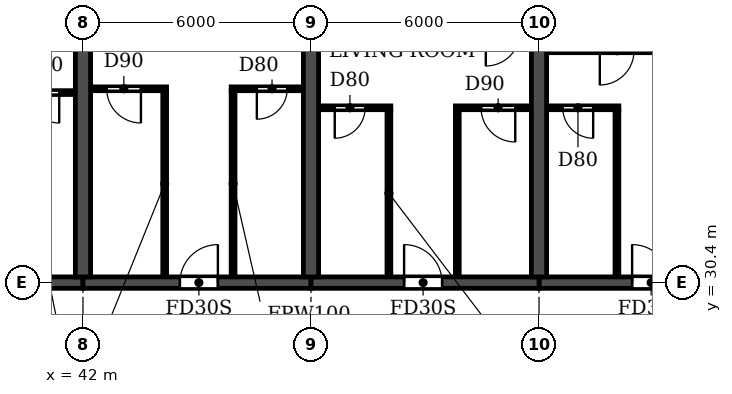
"""IFC4 building model, lengths in metres.
Left out: names, types, materials, properties, quantities, classifications, styles, units other than length and angle.
Written with IfcOpenShell. Run it as: python <this file> out.ifc"""

import sys

from ifc_helpers import new_model, si_unit, direction, frame, frame_2d, origin, place, context, subcontext, project, spatial, rectangle, extrude, element, fill, save


model = new_model("IFC4")
c1 = context("Model", 3, precision=1e-05, world=origin(), true_north=direction((0.0, 1.0)))
c2 = subcontext(c1, "Body", "Model", "MODEL_VIEW")
j1 = project(units=[si_unit("LENGTHUNIT", "METRE"), si_unit("PLANEANGLEUNIT", "RADIAN")], contexts=[c1])
p1 = place(None, origin())
s1 = spatial("IfcSite", under=j1, at=p1, CompositionType="ELEMENT")
p2 = place(p1, origin())
s2 = spatial("IfcBuilding", under=s1, at=p2, CompositionType="ELEMENT")
p3 = place(p2, frame((0.0, 0.0, 23.4)))
s3 = spatial("IfcBuildingStorey", under=s2, at=p3, CompositionType="ELEMENT", Elevation=23.4)
for number, where, z_axis, x_axis in (
    (1, (42.0, 30.55, 0.0), (0.0, 0.0, 1.0), (0.0, 1.0, 0.0)),
    (2, (48.0, 30.55, 0.0), (0.0, 0.0, 1.0), (0.0, 1.0, 0.0)),
    (3, (54.0, 30.55, 0.0), (0.0, 0.0, 1.0), (0.0, 1.0, 0.0)),
):
    element("IfcWall", number, at=place(p3, frame(where, z_axis=z_axis, x_axis=x_axis)), inside=s3, PredefinedType="SHEAR", context=c2, shape_type="SweptSolid", body=[
        extrude(rectangle(XDim=14.05, YDim=0.4, at=frame_2d((7.025, 0.0))), origin(), (0.0, 0.0, 1.0), 3.05),
    ])
p4 = place(p3, frame((36.0, 30.4, 0.0), z_axis=(0.0, 0.0, 1.0), x_axis=(1.0, 0.0, 0.0)))
e4 = element("IfcWall", 4, at=p4, inside=s3, PredefinedType="SHEAR", context=c2, shape_type="SweptSolid", body=[
    extrude(rectangle(XDim=6.0, YDim=0.3, at=frame_2d((3.0, 0.0))), origin(), (0.0, 0.0, 1.0), 2.45),
])
p5 = place(p4, frame((2.55, 0.0, 0.0)))
e5 = element("IfcOpeningElement", 5, at=p5, cuts=e4, PredefinedType="OPENING", context=c2, shape_type="SweptSolid", body=[
    extrude(rectangle(XDim=1.0, YDim=2.1, at=frame_2d((0.5, 1.05))), frame((0.0, 0.16, 0.0), z_axis=(0.0, -1.0, 0.0), x_axis=(1.0, 0.0, 0.0)), (0.0, 0.0, 1.0), 0.32),
])
p6 = place(p3, frame((42.0, 30.4, 0.0), z_axis=(0.0, 0.0, 1.0), x_axis=(1.0, 0.0, 0.0)))
e6 = element("IfcWall", 6, at=p6, inside=s3, PredefinedType="SHEAR", context=c2, shape_type="SweptSolid", body=[
    extrude(rectangle(XDim=6.0, YDim=0.3, at=frame_2d((3.0, 0.0))), origin(), (0.0, 0.0, 1.0), 2.45),
])
p7 = place(p6, frame((2.55, 0.0, 0.0)))
e7 = element("IfcOpeningElement", 7, at=p7, cuts=e6, PredefinedType="OPENING", context=c2, shape_type="SweptSolid", body=[
    extrude(rectangle(XDim=1.0, YDim=2.1, at=frame_2d((0.5, 1.05))), frame((0.0, 0.16, 0.0), z_axis=(0.0, -1.0, 0.0), x_axis=(1.0, 0.0, 0.0)), (0.0, 0.0, 1.0), 0.32),
])
p8 = place(p3, frame((48.0, 30.4, 0.0), z_axis=(0.0, 0.0, 1.0), x_axis=(1.0, 0.0, 0.0)))
e8 = element("IfcWall", 8, at=p8, inside=s3, PredefinedType="SHEAR", context=c2, shape_type="SweptSolid", body=[
    extrude(rectangle(XDim=6.0, YDim=0.3, at=frame_2d((3.0, 0.0))), origin(), (0.0, 0.0, 1.0), 2.45),
])
p9 = place(p8, frame((2.45, 0.0, 0.0)))
e9 = element("IfcOpeningElement", 9, at=p9, cuts=e8, PredefinedType="OPENING", context=c2, shape_type="SweptSolid", body=[
    extrude(rectangle(XDim=1.0, YDim=2.1, at=frame_2d((0.5, 1.05))), frame((0.0, 0.16, 0.0), z_axis=(0.0, -1.0, 0.0), x_axis=(1.0, 0.0, 0.0)), (0.0, 0.0, 1.0), 0.32),
])
p10 = place(p3, frame((54.0, 30.4, 0.0), z_axis=(0.0, 0.0, 1.0), x_axis=(1.0, 0.0, 0.0)))
e10 = element("IfcWall", 10, at=p10, inside=s3, PredefinedType="SHEAR", context=c2, shape_type="SweptSolid", body=[
    extrude(rectangle(XDim=6.0, YDim=0.3, at=frame_2d((3.0, 0.0))), origin(), (0.0, 0.0, 1.0), 2.45),
])
p11 = place(p10, frame((2.45, 0.0, 0.0)))
e11 = element("IfcOpeningElement", 11, at=p11, cuts=e10, PredefinedType="OPENING", context=c2, shape_type="SweptSolid", body=[
    extrude(rectangle(XDim=1.0, YDim=2.1, at=frame_2d((0.5, 1.05))), frame((0.0, 0.16, 0.0), z_axis=(0.0, -1.0, 0.0), x_axis=(1.0, 0.0, 0.0)), (0.0, 0.0, 1.0), 0.32),
])
p12 = place(p3, frame((48.21, 35.0, 0.0), z_axis=(0.0, 0.0, 1.0), x_axis=(1.0, 0.0, 0.0)))
e12 = element("IfcWall", 12, at=p12, inside=s3, PredefinedType="PARTITIONING", context=c2, shape_type="SweptSolid", body=[
    extrude(rectangle(XDim=1.89, YDim=0.1, at=frame_2d((0.945, 0.0))), origin(), (0.0, 0.0, 1.0), 3.05),
])
p13 = place(p12, frame((0.415, 0.0, 0.0)))
e13 = element("IfcOpeningElement", 13, at=p13, cuts=e12, PredefinedType="OPENING", context=c2, shape_type="SweptSolid", body=[
    extrude(rectangle(XDim=0.8, YDim=2.1, at=frame_2d((0.4, 1.05))), frame((0.0, 0.06, 0.0), z_axis=(0.0, -1.0, 0.0), x_axis=(1.0, 0.0, 0.0)), (0.0, 0.0, 1.0), 0.12),
])
p14 = place(p3, frame((51.8, 35.0, 0.0), z_axis=(0.0, 0.0, 1.0), x_axis=(1.0, 0.0, 0.0)))
e14 = element("IfcWall", 14, at=p14, inside=s3, PredefinedType="PARTITIONING", context=c2, shape_type="SweptSolid", body=[
    extrude(rectangle(XDim=1.99, YDim=0.1, at=frame_2d((0.995, 0.0))), origin(), (0.0, 0.0, 1.0), 3.05),
])
p15 = place(p14, frame((0.675, 0.0, 0.0)))
e15 = element("IfcOpeningElement", 15, at=p15, cuts=e14, PredefinedType="OPENING", context=c2, shape_type="SweptSolid", body=[
    extrude(rectangle(XDim=0.9, YDim=2.1, at=frame_2d((0.45, 1.05))), frame((0.0, 0.06, 0.0), z_axis=(0.0, -1.0, 0.0), x_axis=(1.0, 0.0, 0.0)), (0.0, 0.0, 1.0), 0.12),
])
p16 = place(p3, frame((54.21, 35.0, 0.0), z_axis=(0.0, 0.0, 1.0), x_axis=(1.0, 0.0, 0.0)))
e16 = element("IfcWall", 16, at=p16, inside=s3, PredefinedType="PARTITIONING", context=c2, shape_type="SweptSolid", body=[
    extrude(rectangle(XDim=1.89, YDim=0.1, at=frame_2d((0.945, 0.0))), origin(), (0.0, 0.0, 1.0), 3.05),
])
p17 = place(p16, frame((0.415, 0.0, 0.0)))
e17 = element("IfcOpeningElement", 17, at=p17, cuts=e16, PredefinedType="OPENING", context=c2, shape_type="SweptSolid", body=[
    extrude(rectangle(XDim=0.8, YDim=2.1, at=frame_2d((0.4, 1.05))), frame((0.0, 0.06, 0.0), z_axis=(0.0, -1.0, 0.0), x_axis=(1.0, 0.0, 0.0)), (0.0, 0.0, 1.0), 0.12),
])
p18 = place(p3, frame((39.9, 35.4, 0.0), z_axis=(0.0, 0.0, 1.0), x_axis=(1.0, 0.0, 0.0)))
e18 = element("IfcWall", 18, at=p18, inside=s3, PredefinedType="PARTITIONING", context=c2, shape_type="SweptSolid", body=[
    extrude(rectangle(XDim=1.89, YDim=0.1, at=frame_2d((0.945, 0.0))), origin(), (0.0, 0.0, 1.0), 3.05),
])
p19 = place(p18, frame((0.675, 0.0, 0.0)))
e19 = element("IfcOpeningElement", 19, at=p19, cuts=e18, PredefinedType="OPENING", context=c2, shape_type="SweptSolid", body=[
    extrude(rectangle(XDim=0.8, YDim=2.1, at=frame_2d((0.4, 1.05))), frame((0.0, 0.06, 0.0), z_axis=(0.0, -1.0, 0.0), x_axis=(1.0, 0.0, 0.0)), (0.0, 0.0, 1.0), 0.12),
])
p20 = place(p3, frame((42.21, 35.5, 0.0), z_axis=(0.0, 0.0, 1.0), x_axis=(1.0, 0.0, 0.0)))
e20 = element("IfcWall", 20, at=p20, inside=s3, PredefinedType="PARTITIONING", context=c2, shape_type="SweptSolid", body=[
    extrude(rectangle(XDim=1.99, YDim=0.1, at=frame_2d((0.995, 0.0))), origin(), (0.0, 0.0, 1.0), 3.05),
])
p21 = place(p20, frame((0.415, 0.0, 0.0)))
e21 = element("IfcOpeningElement", 21, at=p21, cuts=e20, PredefinedType="OPENING", context=c2, shape_type="SweptSolid", body=[
    extrude(rectangle(XDim=0.9, YDim=2.1, at=frame_2d((0.45, 1.05))), frame((0.0, 0.06, 0.0), z_axis=(0.0, -1.0, 0.0), x_axis=(1.0, 0.0, 0.0)), (0.0, 0.0, 1.0), 0.12),
])
p22 = place(p3, frame((45.9, 35.5, 0.0), z_axis=(0.0, 0.0, 1.0), x_axis=(1.0, 0.0, 0.0)))
e22 = element("IfcWall", 22, at=p22, inside=s3, PredefinedType="PARTITIONING", context=c2, shape_type="SweptSolid", body=[
    extrude(rectangle(XDim=1.89, YDim=0.1, at=frame_2d((0.945, 0.0))), origin(), (0.0, 0.0, 1.0), 3.05),
])
p23 = place(p22, frame((0.675, 0.0, 0.0)))
e23 = element("IfcOpeningElement", 23, at=p23, cuts=e22, PredefinedType="OPENING", context=c2, shape_type="SweptSolid", body=[
    extrude(rectangle(XDim=0.8, YDim=2.1, at=frame_2d((0.4, 1.05))), frame((0.0, 0.06, 0.0), z_axis=(0.0, -1.0, 0.0), x_axis=(1.0, 0.0, 0.0)), (0.0, 0.0, 1.0), 0.12),
])
for number, where, z_axis, x_axis in (
    (24, (44.15, 30.56, 0.0), (0.0, 0.0, 1.0), (0.0, 1.0, 0.0)),
    (25, (45.95, 30.56, 0.0), (0.0, 0.0, 1.0), (0.0, 1.0, 0.0)),
):
    element("IfcWall", number, at=place(p3, frame(where, z_axis=z_axis, x_axis=x_axis)), inside=s3, PredefinedType="PARTITIONING", context=c2, shape_type="SweptSolid", body=[
        extrude(rectangle(XDim=4.89, YDim=0.1, at=frame_2d((2.445, 0.0))), origin(), (0.0, 0.0, 1.0), 3.05),
    ])
for number, where, z_axis, x_axis in (
    (26, (50.05, 30.56, 0.0), (0.0, 0.0, 1.0), (0.0, 1.0, 0.0)),
    (27, (51.85, 30.56, 0.0), (0.0, 0.0, 1.0), (0.0, 1.0, 0.0)),
    (28, (56.05, 30.56, 0.0), (0.0, 0.0, 1.0), (0.0, 1.0, 0.0)),
):
    element("IfcWall", number, at=place(p3, frame(where, z_axis=z_axis, x_axis=x_axis)), inside=s3, PredefinedType="PARTITIONING", context=c2, shape_type="SweptSolid", body=[
        extrude(rectangle(XDim=4.39, YDim=0.1, at=frame_2d((2.195, 0.0))), origin(), (0.0, 0.0, 1.0), 3.05),
    ])
p24 = place(p19, frame((0.8, 0.0, 0.0), z_axis=(0.0, 0.0, 1.0), x_axis=(-1.0, 0.0, 0.0)))
e29 = element("IfcDoor", 29, at=p24, inside=s3, OperationType="SINGLE_SWING_LEFT", PredefinedType="DOOR", context=c2, shape_type="SweptSolid", body=[
    extrude(rectangle(XDim=0.8, YDim=2.1, at=frame_2d((0.4, 1.05))), frame((0.0, 0.025, 0.0), z_axis=(0.0, -1.0, 0.0), x_axis=(1.0, 0.0, 0.0)), (0.0, 0.0, 1.0), 0.05),
])
fill(e19, e29)
p25 = place(p21, frame((0.9, 0.0, 0.0), z_axis=(0.0, 0.0, 1.0), x_axis=(-1.0, 0.0, 0.0)))
e30 = element("IfcDoor", 30, at=p25, inside=s3, OperationType="SINGLE_SWING_LEFT", PredefinedType="DOOR", context=c2, shape_type="SweptSolid", body=[
    extrude(rectangle(XDim=0.9, YDim=2.1, at=frame_2d((0.45, 1.05))), frame((0.0, 0.025, 0.0), z_axis=(0.0, -1.0, 0.0), x_axis=(1.0, 0.0, 0.0)), (0.0, 0.0, 1.0), 0.05),
])
fill(e21, e30)
p26 = place(p7, origin())
e31 = element("IfcDoor", 31, at=p26, inside=s3, OperationType="SINGLE_SWING_RIGHT", PredefinedType="DOOR", context=c2, shape_type="SweptSolid", body=[
    extrude(rectangle(XDim=1.0, YDim=2.1, at=frame_2d((0.5, 1.05))), frame((0.0, 0.025, 0.0), z_axis=(0.0, -1.0, 0.0), x_axis=(1.0, 0.0, 0.0)), (0.0, 0.0, 1.0), 0.05),
])
fill(e7, e31)
p27 = place(p23, frame((0.8, 0.0, 0.0), z_axis=(0.0, 0.0, 1.0), x_axis=(-1.0, 0.0, 0.0)))
e32 = element("IfcDoor", 32, at=p27, inside=s3, OperationType="SINGLE_SWING_RIGHT", PredefinedType="DOOR", context=c2, shape_type="SweptSolid", body=[
    extrude(rectangle(XDim=0.8, YDim=2.1, at=frame_2d((0.4, 1.05))), frame((0.0, 0.025, 0.0), z_axis=(0.0, -1.0, 0.0), x_axis=(1.0, 0.0, 0.0)), (0.0, 0.0, 1.0), 0.05),
])
fill(e23, e32)
p28 = place(p13, frame((0.8, 0.0, 0.0), z_axis=(0.0, 0.0, 1.0), x_axis=(-1.0, 0.0, 0.0)))
e33 = element("IfcDoor", 33, at=p28, inside=s3, OperationType="SINGLE_SWING_RIGHT", PredefinedType="DOOR", context=c2, shape_type="SweptSolid", body=[
    extrude(rectangle(XDim=0.8, YDim=2.1, at=frame_2d((0.4, 1.05))), frame((0.0, 0.025, 0.0), z_axis=(0.0, -1.0, 0.0), x_axis=(1.0, 0.0, 0.0)), (0.0, 0.0, 1.0), 0.05),
])
fill(e13, e33)
p29 = place(p9, origin())
e34 = element("IfcDoor", 34, at=p29, inside=s3, OperationType="SINGLE_SWING_LEFT", PredefinedType="DOOR", context=c2, shape_type="SweptSolid", body=[
    extrude(rectangle(XDim=1.0, YDim=2.1, at=frame_2d((0.5, 1.05))), frame((0.0, 0.025, 0.0), z_axis=(0.0, -1.0, 0.0), x_axis=(1.0, 0.0, 0.0)), (0.0, 0.0, 1.0), 0.05),
])
fill(e9, e34)
p30 = place(p15, frame((0.9, 0.0, 0.0), z_axis=(0.0, 0.0, 1.0), x_axis=(-1.0, 0.0, 0.0)))
e35 = element("IfcDoor", 35, at=p30, inside=s3, OperationType="SINGLE_SWING_LEFT", PredefinedType="DOOR", context=c2, shape_type="SweptSolid", body=[
    extrude(rectangle(XDim=0.9, YDim=2.1, at=frame_2d((0.45, 1.05))), frame((0.0, 0.025, 0.0), z_axis=(0.0, -1.0, 0.0), x_axis=(1.0, 0.0, 0.0)), (0.0, 0.0, 1.0), 0.05),
])
fill(e15, e35)
p31 = place(p17, frame((0.8, 0.0, 0.0), z_axis=(0.0, 0.0, 1.0), x_axis=(-1.0, 0.0, 0.0)))
e36 = element("IfcDoor", 36, at=p31, inside=s3, OperationType="SINGLE_SWING_LEFT", PredefinedType="DOOR", context=c2, shape_type="SweptSolid", body=[
    extrude(rectangle(XDim=0.8, YDim=2.1, at=frame_2d((0.4, 1.05))), frame((0.0, 0.025, 0.0), z_axis=(0.0, -1.0, 0.0), x_axis=(1.0, 0.0, 0.0)), (0.0, 0.0, 1.0), 0.05),
])
fill(e17, e36)
p32 = place(p11, origin())
e37 = element("IfcDoor", 37, at=p32, inside=s3, OperationType="SINGLE_SWING_LEFT", PredefinedType="DOOR", context=c2, shape_type="SweptSolid", body=[
    extrude(rectangle(XDim=1.0, YDim=2.1, at=frame_2d((0.5, 1.05))), frame((0.0, 0.025, 0.0), z_axis=(0.0, -1.0, 0.0), x_axis=(1.0, 0.0, 0.0)), (0.0, 0.0, 1.0), 0.05),
])
fill(e11, e37)
save(model, sys.argv[1])
